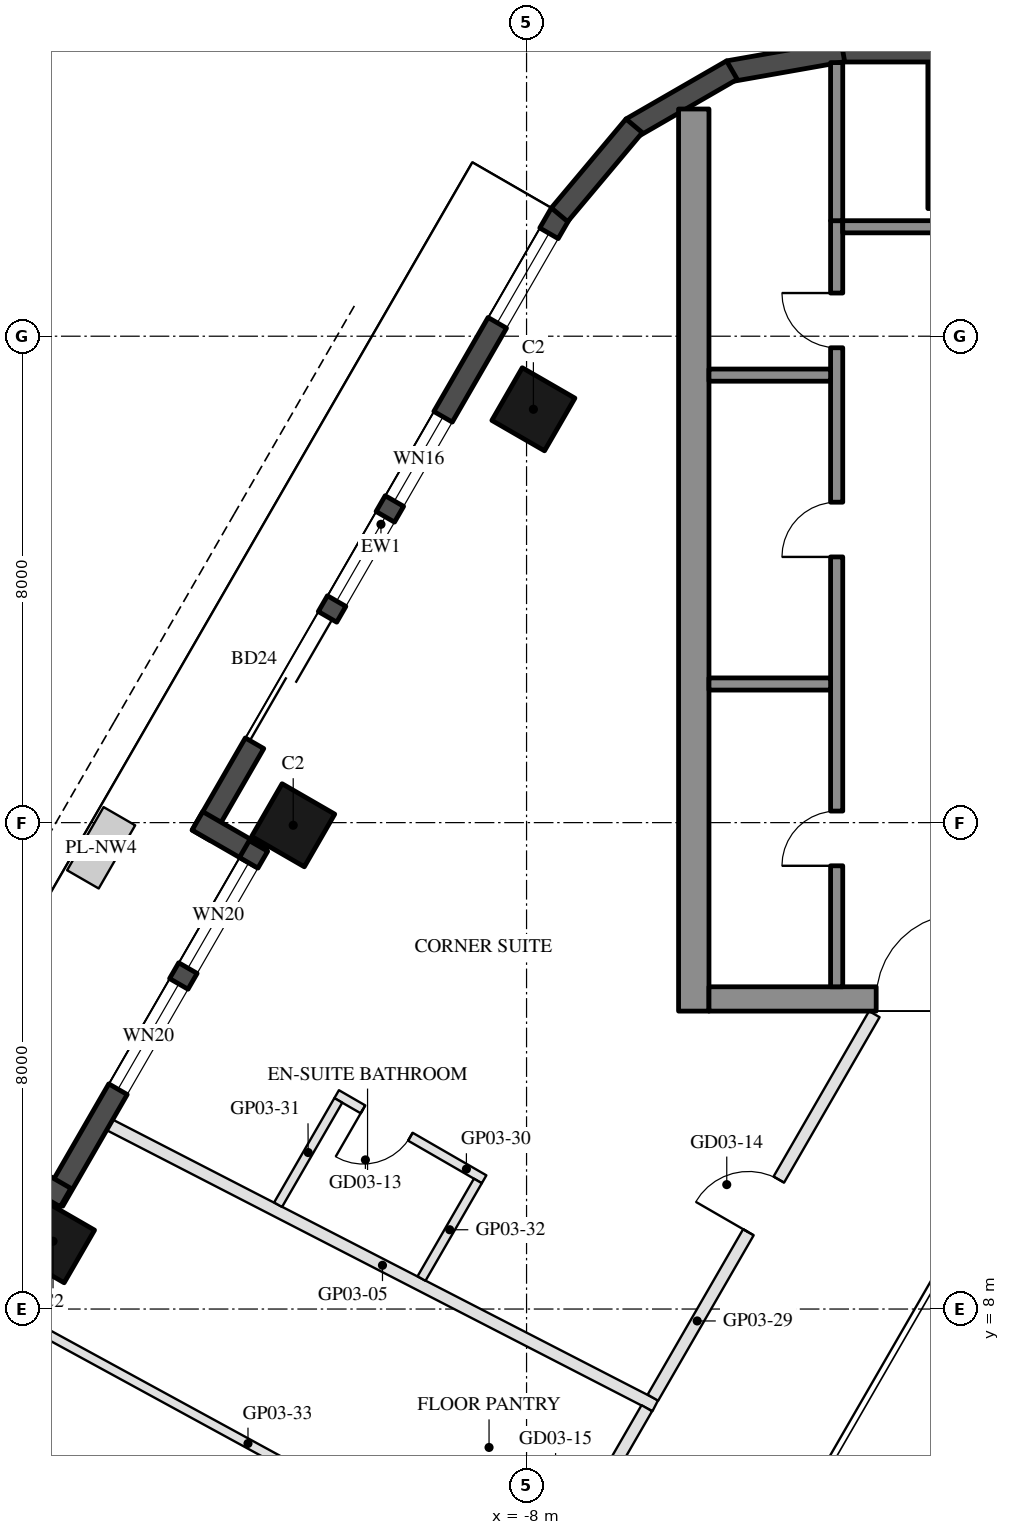
"""IFC4 building model, lengths in metres.
Left out: names, types, materials, properties, quantities, classifications, styles, units other than length and angle.
Written with IfcOpenShell. Run it as: python <this file> out.ifc"""

import sys

from ifc_helpers import new_model, si_unit, direction, frame, frame_2d, origin, origin_2d, place, context, subcontext, project, spatial, rectangle, hollow_rectangle, extrude, element, fill, save


model = new_model("IFC4")
c1 = context("Model", 3, precision=1e-05, world=origin(), true_north=direction((0.0, 1.0)))
c2 = subcontext(c1, "Body", "Model", "MODEL_VIEW")
j1 = project(units=[si_unit("LENGTHUNIT", "METRE"), si_unit("PLANEANGLEUNIT", "RADIAN")], contexts=[c1])
p1 = place(None, origin())
s1 = spatial("IfcSite", under=j1, at=p1, CompositionType="ELEMENT")
p2 = place(p1, origin())
s2 = spatial("IfcBuilding", under=s1, at=p2, CompositionType="ELEMENT")
p3 = place(p2, frame((0.0, 0.0, 61.3)))
s3 = spatial("IfcBuildingStorey", under=s2, at=p3, CompositionType="ELEMENT", Elevation=61.3)
for number, where, z_axis, x_axis in (
    (1, (-7.888, 22.798, 0.0), (0.0, 0.0, 1.0), (0.5, 0.866, 0.0)),
    (2, (-11.838, 15.957, 0.0), (0.0, 0.0, 1.0), (0.5, 0.866, 0.0)),
    (3, (-15.788, 9.115, 0.0), (0.0, 0.0, 1.0), (0.5, 0.866, 0.0)),
):
    element("IfcColumn", number, at=place(p3, frame(where, z_axis=z_axis, x_axis=x_axis)), inside=s3, PredefinedType="COLUMN", context=c2, shape_type="SweptSolid", body=[
        extrude(hollow_rectangle(XDim=1.0, YDim=1.0, WallThickness=0.045, at=origin_2d()), origin(), (0.0, 0.0, 1.0), 3.7),
    ])
p4 = place(p3, frame((0.0, 27.3, 0.0), z_axis=(0.0, 0.0, 1.0), x_axis=(1.0, 0.0, 0.0)))
e4 = element("IfcColumn", 4, at=p4, inside=s3, PredefinedType="COLUMN", context=c2, shape_type="SweptSolid", body=[
    extrude(hollow_rectangle(XDim=2.8, YDim=2.4, WallThickness=0.07, at=origin_2d()), origin(), (0.0, 0.0, 1.0), 3.7),
])
p5 = place(p3, frame((-7.441, 26.022, 0.0), z_axis=(0.0, 0.0, 1.0), x_axis=(-0.499992533062, -0.86602971478, 0.0)))
e5 = element("IfcWall", 5, at=p5, inside=s3, PredefinedType="SOLIDWALL", context=c2, shape_type="SweptSolid", body=[
    extrude(rectangle(XDim=11.816, YDim=0.35, at=frame_2d((5.908, 0.0))), origin(), (0.0, 0.0, 1.0), 3.55),
])
p6 = place(p5, frame((0.381, 0.0, 0.3)))
e6 = element("IfcOpeningElement", 6, at=p6, cuts=e5, PredefinedType="OPENING", context=c2, shape_type="SweptSolid", body=[
    extrude(rectangle(XDim=1.7, YDim=2.65, at=frame_2d((0.85, 1.325))), frame((0.0, 0.185, 0.0), z_axis=(0.0, -1.0, 0.0), x_axis=(1.0, 0.0, 0.0)), (0.0, 0.0, 1.0), 0.37),
])
p7 = place(p5, frame((7.666, 0.0, 0.0)))
e7 = element("IfcOpeningElement", 7, at=p7, cuts=e5, PredefinedType="OPENING", context=c2, shape_type="SweptSolid", body=[
    extrude(rectangle(XDim=2.4, YDim=2.4, at=frame_2d((1.2, 1.2))), frame((0.0, 0.185, 0.0), z_axis=(0.0, -1.0, 0.0), x_axis=(1.0, 0.0, 0.0)), (0.0, 0.0, 1.0), 0.37),
])
p8 = place(p5, frame((3.865, 0.0, 0.3)))
e8 = element("IfcOpeningElement", 8, at=p8, cuts=e5, PredefinedType="OPENING", context=c2, shape_type="SweptSolid", body=[
    extrude(rectangle(XDim=1.6, YDim=2.65, at=frame_2d((0.8, 1.325))), frame((0.0, 0.185, 0.0), z_axis=(0.0, -1.0, 0.0), x_axis=(1.0, 0.0, 0.0)), (0.0, 0.0, 1.0), 0.37),
])
p9 = place(p5, frame((5.765, 0.0, 0.3)))
e9 = element("IfcOpeningElement", 9, at=p9, cuts=e5, PredefinedType="OPENING", context=c2, shape_type="SweptSolid", body=[
    extrude(rectangle(XDim=1.6, YDim=2.65, at=frame_2d((0.8, 1.325))), frame((0.0, 0.185, 0.0), z_axis=(0.0, -1.0, 0.0), x_axis=(1.0, 0.0, 0.0)), (0.0, 0.0, 1.0), 0.37),
])
p10 = place(p3, frame((-13.413, 16.029, 0.0), z_axis=(0.0, 0.0, 1.0), x_axis=(0.866005645448, -0.500034220881, 0.0)))
e10 = element("IfcWall", 10, at=p10, inside=s3, PredefinedType="SOLIDWALL", context=c2, shape_type="SweptSolid", body=[
    extrude(rectangle(XDim=1.22, YDim=0.35, at=frame_2d((0.61, 0.0))), origin(), (0.0, 0.0, 1.0), 3.55),
])
p11 = place(p3, frame((-12.409, 15.617, 0.0), z_axis=(0.0, 0.0, 1.0), x_axis=(-0.500003597184, -0.866023326939, 0.0)))
e11 = element("IfcWall", 11, at=p11, inside=s3, PredefinedType="SOLIDWALL", context=c2, shape_type="SweptSolid", body=[
    extrude(rectangle(XDim=6.74, YDim=0.35, at=frame_2d((3.37, 0.0))), origin(), (0.0, 0.0, 1.0), 3.55),
])
p12 = place(p11, frame((0.32, 0.0, 0.3)))
e12 = element("IfcOpeningElement", 12, at=p12, cuts=e11, PredefinedType="OPENING", context=c2, shape_type="SweptSolid", body=[
    extrude(rectangle(XDim=2.0, YDim=2.65, at=frame_2d((1.0, 1.325))), frame((0.0, 0.185, 0.0), z_axis=(0.0, -1.0, 0.0), x_axis=(1.0, 0.0, 0.0)), (0.0, 0.0, 1.0), 0.37),
])
p13 = place(p11, frame((2.62, 0.0, 0.3)))
e13 = element("IfcOpeningElement", 13, at=p13, cuts=e11, PredefinedType="OPENING", context=c2, shape_type="SweptSolid", body=[
    extrude(rectangle(XDim=2.0, YDim=2.65, at=frame_2d((1.0, 1.325))), frame((0.0, 0.185, 0.0), z_axis=(0.0, -1.0, 0.0), x_axis=(1.0, 0.0, 0.0)), (0.0, 0.0, 1.0), 0.37),
])
p14 = place(p3, frame((-15.581, 9.833, 0.0), z_axis=(0.0, 0.0, 1.0), x_axis=(-0.866055662726, 0.499947586314, 0.0)))
e14 = element("IfcWall", 14, at=p14, inside=s3, PredefinedType="SOLIDWALL", context=c2, shape_type="SweptSolid", body=[
    extrude(rectangle(XDim=1.22, YDim=0.35, at=frame_2d((0.61, 0.0))), origin(), (0.0, 0.0, 1.0), 3.55),
])
p15 = place(p3, frame((2.829, 28.685, 0.0), z_axis=(0.0, 0.0, 1.0), x_axis=(-1.0, 0.0, 0.0)))
e15 = element("IfcWall", 15, at=p15, inside=s3, PredefinedType="SOLIDWALL", context=c2, shape_type="SweptSolid", body=[
    extrude(rectangle(XDim=5.658, YDim=0.35, at=frame_2d((2.829, 0.0))), origin(), (0.0, 0.0, 1.0), 3.55),
])
for number, where, z_axis, x_axis in (
    (16, (-2.799, 28.688, 0.0), (0.0, 0.0, 1.0), (-0.985, -0.174, 0.0)),
    (17, (-4.623, 28.377, 0.0), (0.0, 0.0, 1.0), (-0.866, -0.5, 0.0)),
):
    element("IfcWall", number, at=place(p3, frame(where, z_axis=z_axis, x_axis=x_axis)), inside=s3, PredefinedType="SOLIDWALL", context=c2, shape_type="SweptSolid", body=[
        extrude(rectangle(XDim=1.91, YDim=0.35, at=frame_2d((0.955, 0.0))), origin(), (0.0, 0.0, 1.0), 3.55),
    ])
p16 = place(p3, frame((-6.23, 27.461, 0.0), z_axis=(0.0, 0.0, 1.0), x_axis=(-0.642808304945, -0.766027077259, 0.0)))
e18 = element("IfcWall", 18, at=p16, inside=s3, PredefinedType="SOLIDWALL", context=c2, shape_type="SweptSolid", body=[
    extrude(rectangle(XDim=1.91, YDim=0.35, at=frame_2d((0.955, 0.0))), origin(), (0.0, 0.0, 1.0), 3.55),
])
p17 = place(p3, frame((-5.25, 12.9, 0.0), z_axis=(0.0, 0.0, 1.0), x_axis=(0.0, 1.0, 0.0)))
e19 = element("IfcWall", 19, at=p17, inside=s3, PredefinedType="SHEAR", context=c2, shape_type="SweptSolid", body=[
    extrude(rectangle(XDim=14.837, YDim=0.5, at=frame_2d((7.418, 0.0))), origin(), (0.0, 0.0, 1.0), 3.5),
])
p18 = place(p3, frame((5.0, 13.1, 0.0), z_axis=(0.0, 0.0, 1.0), x_axis=(-1.0, 0.0, 0.0)))
e20 = element("IfcWall", 20, at=p18, inside=s3, PredefinedType="SHEAR", context=c2, shape_type="SweptSolid", body=[
    extrude(rectangle(XDim=10.0, YDim=0.4, at=frame_2d((5.0, 0.0))), origin(), (0.0, 0.0, 1.0), 3.5),
])
p19 = place(p18, frame((3.55, 0.0, 0.0)))
e21 = element("IfcOpeningElement", 21, at=p19, cuts=e20, PredefinedType="OPENING", context=c2, shape_type="SweptSolid", body=[
    extrude(rectangle(XDim=1.1, YDim=2.1, at=frame_2d((0.55, 1.05))), frame((0.0, 0.21, 0.0), z_axis=(0.0, -1.0, 0.0), x_axis=(1.0, 0.0, 0.0)), (0.0, 0.0, 1.0), 0.42),
])
p20 = place(p18, frame((5.85, 0.0, 0.0)))
e22 = element("IfcOpeningElement", 22, at=p20, cuts=e20, PredefinedType="OPENING", context=c2, shape_type="SweptSolid", body=[
    extrude(rectangle(XDim=1.4, YDim=2.1, at=frame_2d((0.7, 1.05))), frame((0.0, 0.21, 0.0), z_axis=(0.0, -1.0, 0.0), x_axis=(1.0, 0.0, 0.0)), (0.0, 0.0, 1.0), 0.42),
])
p21 = place(p3, frame((-2.9, 13.3, 0.0), z_axis=(0.0, 0.0, 1.0), x_axis=(0.0, 1.0, 0.0)))
e23 = element("IfcWall", 23, at=p21, inside=s3, PredefinedType="SHEAR", context=c2, shape_type="SweptSolid", body=[
    extrude(rectangle(XDim=12.6, YDim=0.2, at=frame_2d((6.3, 0.0))), origin(), (0.0, 0.0, 1.0), 3.5),
])
p22 = place(p21, frame((1.99, 0.0, 0.0)))
e24 = element("IfcOpeningElement", 24, at=p22, cuts=e23, PredefinedType="OPENING", context=c2, shape_type="SweptSolid", body=[
    extrude(rectangle(XDim=0.9, YDim=2.1, at=frame_2d((0.45, 1.05))), frame((0.0, 0.11, 0.0), z_axis=(0.0, -1.0, 0.0), x_axis=(1.0, 0.0, 0.0)), (0.0, 0.0, 1.0), 0.22),
])
p23 = place(p21, frame((7.07, 0.0, 0.0)))
e25 = element("IfcOpeningElement", 25, at=p23, cuts=e23, PredefinedType="OPENING", context=c2, shape_type="SweptSolid", body=[
    extrude(rectangle(XDim=0.9, YDim=2.1, at=frame_2d((0.45, 1.05))), frame((0.0, 0.11, 0.0), z_axis=(0.0, -1.0, 0.0), x_axis=(1.0, 0.0, 0.0)), (0.0, 0.0, 1.0), 0.22),
])
p24 = place(p21, frame((10.51, 0.0, 0.0)))
e26 = element("IfcOpeningElement", 26, at=p24, cuts=e23, PredefinedType="OPENING", context=c2, shape_type="SweptSolid", body=[
    extrude(rectangle(XDim=0.9, YDim=2.1, at=frame_2d((0.45, 1.05))), frame((0.0, 0.11, 0.0), z_axis=(0.0, -1.0, 0.0), x_axis=(1.0, 0.0, 0.0)), (0.0, 0.0, 1.0), 0.22),
])
p25 = place(p3, frame((-0.4, 25.8, 0.0), z_axis=(0.0, 0.0, 1.0), x_axis=(-1.0, 0.0, 0.0)))
e27 = element("IfcWall", 27, at=p25, inside=s3, PredefinedType="SHEAR", context=c2, shape_type="SweptSolid", body=[
    extrude(rectangle(XDim=2.4, YDim=0.2, at=frame_2d((1.2, 0.0))), origin(), (0.0, 0.0, 1.0), 3.5),
])
for number, where, z_axis, x_axis in (
    (28, (-3.0, 18.28, 0.0), (0.0, 0.0, 1.0), (-1.0, 0.0, 0.0)),
    (29, (-3.0, 23.36, 0.0), (0.0, 0.0, 1.0), (-1.0, 0.0, 0.0)),
):
    element("IfcWall", number, at=place(p3, frame(where, z_axis=z_axis, x_axis=x_axis)), inside=s3, PredefinedType="SHEAR", context=c2, shape_type="SweptSolid", body=[
        extrude(rectangle(XDim=2.0, YDim=0.2, at=frame_2d((1.0, 0.0))), origin(), (0.0, 0.0, 1.0), 3.5),
    ])
p26 = place(p3, frame((-2.9, 25.9, 0.0), z_axis=(0.0, 0.0, 1.0), x_axis=(0.0, 1.0, 0.0)))
e30 = element("IfcWall", 30, at=p26, inside=s3, PredefinedType="SHEAR", context=c2, shape_type="SweptSolid", body=[
    extrude(rectangle(XDim=2.6, YDim=0.2, at=frame_2d((1.3, 0.0))), origin(), (0.0, 0.0, 1.0), 3.5),
])
p27 = place(p3, frame((-14.856, 11.029, 0.0), z_axis=(0.0, 0.0, 1.0), x_axis=(0.889105841633, -0.457701652142, 0.0)))
e31 = element("IfcWall", 31, at=p27, inside=s3, PredefinedType="PARTITIONING", context=c2, shape_type="SweptSolid", body=[
    extrude(rectangle(XDim=10.092, YDim=0.2, at=frame_2d((5.046, 0.0))), origin(), (0.0, 0.0, 1.0), 2.96),
])
p28 = place(p3, frame((-5.922, 6.542, 0.0), z_axis=(0.0, 0.0, 1.0), x_axis=(0.499989401968, 0.866031522475, 0.0)))
e32 = element("IfcWall", 32, at=p28, inside=s3, PredefinedType="PARTITIONING", context=c2, shape_type="SweptSolid", body=[
    extrude(rectangle(XDim=7.283, YDim=0.2, at=frame_2d((3.642, 0.0))), origin(), (0.0, 0.0, 1.0), 2.95),
])
p29 = place(p28, frame((3.142, 0.0, 0.0)))
e33 = element("IfcOpeningElement", 33, at=p29, cuts=e32, PredefinedType="OPENING", context=c2, shape_type="SweptSolid", body=[
    extrude(rectangle(XDim=1.0, YDim=2.1, at=frame_2d((0.5, 1.05))), frame((0.0, 0.11, 0.0), z_axis=(0.0, -1.0, 0.0), x_axis=(1.0, 0.0, 0.0)), (0.0, 0.0, 1.0), 0.22),
])
p30 = place(p3, frame((-8.698, 10.134, 0.0), z_axis=(0.0, 0.0, 1.0), x_axis=(-0.866034573852, 0.49998411664, 0.0)))
e34 = element("IfcWall", 34, at=p30, inside=s3, PredefinedType="PARTITIONING", context=c2, shape_type="SweptSolid", body=[
    extrude(rectangle(XDim=2.8, YDim=0.15, at=frame_2d((1.4, 0.0))), origin(), (0.0, 0.0, 1.0), 3.55),
])
p31 = place(p30, frame((1.4, 0.0, 0.0)))
e35 = element("IfcOpeningElement", 35, at=p31, cuts=e34, PredefinedType="OPENING", context=c2, shape_type="SweptSolid", body=[
    extrude(rectangle(XDim=0.9, YDim=2.1, at=frame_2d((0.45, 1.05))), frame((0.0, 0.085, 0.0), z_axis=(0.0, -1.0, 0.0), x_axis=(1.0, 0.0, 0.0)), (0.0, 0.0, 1.0), 0.17),
])
p32 = place(p3, frame((-11.096, 11.432, 0.0), z_axis=(0.0, 0.0, 1.0), x_axis=(-0.500035331196, -0.866005004348, 0.0)))
e36 = element("IfcWall", 36, at=p32, inside=s3, PredefinedType="PARTITIONING", context=c2, shape_type="SweptSolid", body=[
    extrude(rectangle(XDim=1.981, YDim=0.15, at=frame_2d((0.991, 0.0))), origin(), (0.0, 0.0, 1.0), 2.95),
])
p33 = place(p3, frame((-8.801, 10.107, 0.0), z_axis=(0.0, 0.0, 1.0), x_axis=(-0.499992292652, -0.866029853578, 0.0)))
e37 = element("IfcWall", 37, at=p33, inside=s3, PredefinedType="PARTITIONING", context=c2, shape_type="SweptSolid", body=[
    extrude(rectangle(XDim=1.854, YDim=0.15, at=frame_2d((0.927, 0.0))), origin(), (0.0, 0.0, 1.0), 2.95),
])
p34 = place(p3, frame((-17.402, 8.419, 0.0), z_axis=(0.0, 0.0, 1.0), x_axis=(0.877831004422, -0.47897048727, 0.0)))
e38 = element("IfcWall", 38, at=p34, inside=s3, PredefinedType="PARTITIONING", context=c2, shape_type="SweptSolid", body=[
    extrude(rectangle(XDim=10.983, YDim=0.15, at=frame_2d((5.492, 0.0))), origin(), (0.0, 0.0, 1.0), 2.96),
])
p35 = place(p3, frame((-7.811, 3.271, 0.0), z_axis=(0.0, 0.0, 1.0), x_axis=(0.4999705729, 0.866042392862, 0.0)))
e39 = element("IfcWall", 39, at=p35, inside=s3, PredefinedType="PARTITIONING", context=c2, shape_type="SweptSolid", body=[
    extrude(rectangle(XDim=3.577, YDim=0.2, at=frame_2d((1.789, 0.0))), origin(), (0.0, 0.0, 1.0), 2.95),
])
p36 = place(p35, frame((1.339, 0.0, 0.0)))
e40 = element("IfcOpeningElement", 40, at=p36, cuts=e39, PredefinedType="OPENING", context=c2, shape_type="SweptSolid", body=[
    extrude(rectangle(XDim=0.9, YDim=2.1, at=frame_2d((0.45, 1.05))), frame((0.0, 0.11, 0.0), z_axis=(0.0, -1.0, 0.0), x_axis=(1.0, 0.0, 0.0)), (0.0, 0.0, 1.0), 0.22),
])
p37 = place(p6, origin())
e41 = element("IfcWindow", 41, at=p37, inside=s3, PartitioningType="SINGLE_PANEL", PredefinedType="WINDOW", context=c2, shape_type="SweptSolid", body=[
    extrude(rectangle(XDim=1.7, YDim=2.65, at=frame_2d((0.85, 1.325))), frame((0.0, 0.03, 0.0), z_axis=(0.0, -1.0, 0.0), x_axis=(1.0, 0.0, 0.0)), (0.0, 0.0, 1.0), 0.06),
])
fill(e6, e41)
p38 = place(p7, frame((2.4, 0.0, 0.0), z_axis=(0.0, 0.0, 1.0), x_axis=(-1.0, 0.0, 0.0)))
e42 = element("IfcDoor", 42, at=p38, inside=s3, OperationType="SLIDING_TO_LEFT", PredefinedType="DOOR", context=c2, shape_type="SweptSolid", body=[
    extrude(rectangle(XDim=2.4, YDim=2.4, at=frame_2d((1.2, 1.2))), frame((0.0, 0.025, 0.0), z_axis=(0.0, -1.0, 0.0), x_axis=(1.0, 0.0, 0.0)), (0.0, 0.0, 1.0), 0.05),
])
fill(e7, e42)
p39 = place(p8, origin())
e43 = element("IfcWindow", 43, at=p39, inside=s3, PartitioningType="SINGLE_PANEL", PredefinedType="WINDOW", context=c2, shape_type="SweptSolid", body=[
    extrude(rectangle(XDim=1.6, YDim=2.65, at=frame_2d((0.8, 1.325))), frame((0.0, 0.03, 0.0), z_axis=(0.0, -1.0, 0.0), x_axis=(1.0, 0.0, 0.0)), (0.0, 0.0, 1.0), 0.06),
])
fill(e8, e43)
p40 = place(p9, origin())
e44 = element("IfcWindow", 44, at=p40, inside=s3, PartitioningType="SINGLE_PANEL", PredefinedType="WINDOW", context=c2, shape_type="SweptSolid", body=[
    extrude(rectangle(XDim=1.6, YDim=2.65, at=frame_2d((0.8, 1.325))), frame((0.0, 0.03, 0.0), z_axis=(0.0, -1.0, 0.0), x_axis=(1.0, 0.0, 0.0)), (0.0, 0.0, 1.0), 0.06),
])
fill(e9, e44)
p41 = place(p12, origin())
e45 = element("IfcWindow", 45, at=p41, inside=s3, PartitioningType="SINGLE_PANEL", PredefinedType="WINDOW", context=c2, shape_type="SweptSolid", body=[
    extrude(rectangle(XDim=2.0, YDim=2.65, at=frame_2d((1.0, 1.325))), frame((0.0, 0.03, 0.0), z_axis=(0.0, -1.0, 0.0), x_axis=(1.0, 0.0, 0.0)), (0.0, 0.0, 1.0), 0.06),
])
fill(e12, e45)
p42 = place(p13, origin())
e46 = element("IfcWindow", 46, at=p42, inside=s3, PartitioningType="SINGLE_PANEL", PredefinedType="WINDOW", context=c2, shape_type="SweptSolid", body=[
    extrude(rectangle(XDim=2.0, YDim=2.65, at=frame_2d((1.0, 1.325))), frame((0.0, 0.03, 0.0), z_axis=(0.0, -1.0, 0.0), x_axis=(1.0, 0.0, 0.0)), (0.0, 0.0, 1.0), 0.06),
])
fill(e13, e46)
p43 = place(p22, origin())
e47 = element("IfcDoor", 47, at=p43, inside=s3, OperationType="SINGLE_SWING_LEFT", PredefinedType="DOOR", context=c2, shape_type="SweptSolid", body=[
    extrude(rectangle(XDim=0.9, YDim=2.1, at=frame_2d((0.45, 1.05))), frame((0.0, 0.025, 0.0), z_axis=(0.0, -1.0, 0.0), x_axis=(1.0, 0.0, 0.0)), (0.0, 0.0, 1.0), 0.05),
])
fill(e24, e47)
p44 = place(p23, origin())
e48 = element("IfcDoor", 48, at=p44, inside=s3, OperationType="SINGLE_SWING_LEFT", PredefinedType="DOOR", context=c2, shape_type="SweptSolid", body=[
    extrude(rectangle(XDim=0.9, YDim=2.1, at=frame_2d((0.45, 1.05))), frame((0.0, 0.025, 0.0), z_axis=(0.0, -1.0, 0.0), x_axis=(1.0, 0.0, 0.0)), (0.0, 0.0, 1.0), 0.05),
])
fill(e25, e48)
p45 = place(p24, origin())
e49 = element("IfcDoor", 49, at=p45, inside=s3, OperationType="SINGLE_SWING_RIGHT", PredefinedType="DOOR", context=c2, shape_type="SweptSolid", body=[
    extrude(rectangle(XDim=0.9, YDim=2.1, at=frame_2d((0.45, 1.05))), frame((0.0, 0.025, 0.0), z_axis=(0.0, -1.0, 0.0), x_axis=(1.0, 0.0, 0.0)), (0.0, 0.0, 1.0), 0.05),
])
fill(e26, e49)
p46 = place(p20, frame((1.4, 0.0, 0.0), z_axis=(0.0, 0.0, 1.0), x_axis=(-1.0, 0.0, 0.0)))
e50 = element("IfcDoor", 50, at=p46, inside=s3, OperationType="DOUBLE_DOOR_SINGLE_SWING", PredefinedType="DOOR", context=c2, shape_type="SweptSolid", body=[
    extrude(rectangle(XDim=1.4, YDim=2.1, at=frame_2d((0.7, 1.05))), frame((0.0, 0.025, 0.0), z_axis=(0.0, -1.0, 0.0), x_axis=(1.0, 0.0, 0.0)), (0.0, 0.0, 1.0), 0.05),
])
fill(e22, e50)
p47 = place(p31, origin())
e51 = element("IfcDoor", 51, at=p47, inside=s3, OperationType="SINGLE_SWING_RIGHT", PredefinedType="DOOR", context=c2, shape_type="SweptSolid", body=[
    extrude(rectangle(XDim=0.9, YDim=2.1, at=frame_2d((0.45, 1.05))), frame((0.0, 0.025, 0.0), z_axis=(0.0, -1.0, 0.0), x_axis=(1.0, 0.0, 0.0)), (0.0, 0.0, 1.0), 0.05),
])
fill(e35, e51)
p48 = place(p29, origin())
e52 = element("IfcDoor", 52, at=p48, inside=s3, OperationType="SINGLE_SWING_LEFT", PredefinedType="DOOR", context=c2, shape_type="SweptSolid", body=[
    extrude(rectangle(XDim=1.0, YDim=2.1, at=frame_2d((0.5, 1.05))), frame((0.0, 0.025, 0.0), z_axis=(0.0, -1.0, 0.0), x_axis=(1.0, 0.0, 0.0)), (0.0, 0.0, 1.0), 0.05),
])
fill(e33, e52)
save(model, sys.argv[1])
